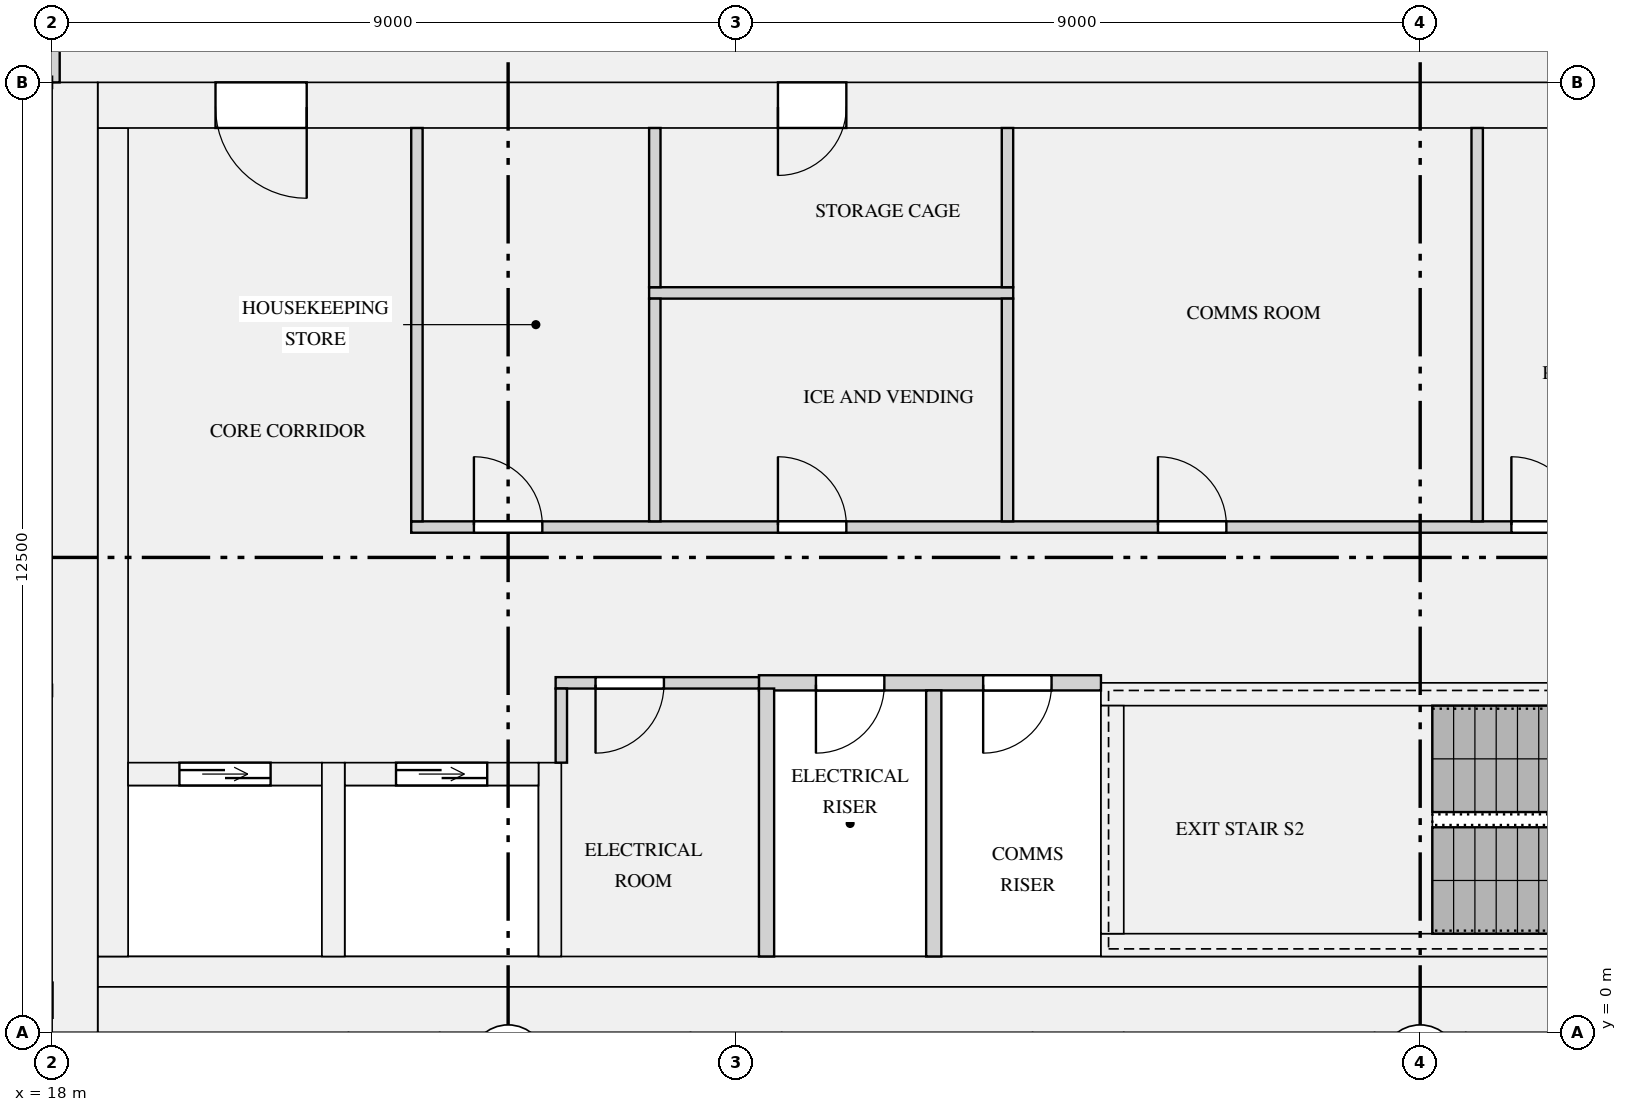
"""IFC4 building model, lengths in metres.
Left out: names, types, materials, properties, quantities, classifications, styles, units other than length and angle.
Written with IfcOpenShell. Run it as: python <this file> out.ifc"""

import sys

from ifc_helpers import new_model, si_unit, direction, frame, frame_2d, origin, place, context, subcontext, project, spatial, rectangle, extrude, element, fill, save


model = new_model("IFC4")
c1 = context("Model", 3, precision=1e-05, world=origin(), true_north=direction((0.0, 1.0)))
c2 = subcontext(c1, "Body", "Model", "MODEL_VIEW")
j1 = project(units=[si_unit("LENGTHUNIT", "METRE"), si_unit("PLANEANGLEUNIT", "RADIAN")], contexts=[c1])
p1 = place(None, origin())
s1 = spatial("IfcSite", under=j1, at=p1, CompositionType="ELEMENT")
p2 = place(p1, origin())
s2 = spatial("IfcBuilding", under=s1, at=p2, CompositionType="ELEMENT")
p3 = place(p2, frame((0.0, 0.0, 216.9)))
s3 = spatial("IfcBuildingStorey", under=s2, at=p3, CompositionType="ELEMENT", Elevation=216.9)
p4 = place(p3, frame((18.3, 0.0, 0.0), z_axis=(0.0, 0.0, 1.0), x_axis=(0.0, 1.0, 0.0)))
e1 = element("IfcWall", 1, at=p4, inside=s3, PredefinedType="SHEAR", context=c2, shape_type="SweptSolid", body=[
    extrude(rectangle(XDim=12.5, YDim=0.6, at=frame_2d((6.25, 0.0))), origin(), (0.0, 0.0, 1.0), 3.15),
])
p5 = place(p3, frame((18.6, 0.3, 0.0), z_axis=(0.0, 0.0, 1.0), x_axis=(1.0, 0.0, 0.0)))
e2 = element("IfcWall", 2, at=p5, inside=s3, PredefinedType="SHEAR", context=c2, shape_type="SweptSolid", body=[
    extrude(rectangle(XDim=34.8, YDim=0.6, at=frame_2d((17.4, 0.0))), origin(), (0.0, 0.0, 1.0), 3.15),
])
p6 = place(p3, frame((18.6, 12.2, 0.0), z_axis=(0.0, 0.0, 1.0), x_axis=(1.0, 0.0, 0.0)))
e3 = element("IfcWall", 3, at=p6, inside=s3, PredefinedType="SHEAR", context=c2, shape_type="SweptSolid", body=[
    extrude(rectangle(XDim=34.8, YDim=0.6, at=frame_2d((17.4, 0.0))), origin(), (0.0, 0.0, 1.0), 3.15),
])
p7 = place(p6, frame((24.575, 0.0, 0.0)))
e4 = element("IfcOpeningElement", 4, at=p7, cuts=e3, PredefinedType="OPENING", context=c2, shape_type="SweptSolid", body=[
    extrude(rectangle(XDim=1.1, YDim=2.1, at=frame_2d((0.55, 1.05))), frame((0.0, 0.31, 0.0), z_axis=(0.0, -1.0, 0.0), x_axis=(1.0, 0.0, 0.0)), (0.0, 0.0, 1.0), 0.62),
])
p8 = place(p6, frame((26.825, 0.0, 0.0)))
e5 = element("IfcOpeningElement", 5, at=p8, cuts=e3, PredefinedType="OPENING", context=c2, shape_type="SweptSolid", body=[
    extrude(rectangle(XDim=1.1, YDim=2.1, at=frame_2d((0.55, 1.05))), frame((0.0, 0.31, 0.0), z_axis=(0.0, -1.0, 0.0), x_axis=(1.0, 0.0, 0.0)), (0.0, 0.0, 1.0), 0.62),
])
p9 = place(p6, frame((29.075, 0.0, 0.0)))
e6 = element("IfcOpeningElement", 6, at=p9, cuts=e3, PredefinedType="OPENING", context=c2, shape_type="SweptSolid", body=[
    extrude(rectangle(XDim=1.1, YDim=2.1, at=frame_2d((0.55, 1.05))), frame((0.0, 0.31, 0.0), z_axis=(0.0, -1.0, 0.0), x_axis=(1.0, 0.0, 0.0)), (0.0, 0.0, 1.0), 0.62),
])
p10 = place(p6, frame((8.95, 0.0, 0.0)))
e7 = element("IfcOpeningElement", 7, at=p10, cuts=e3, PredefinedType="OPENING", context=c2, shape_type="SweptSolid", body=[
    extrude(rectangle(XDim=0.9, YDim=2.1, at=frame_2d((0.45, 1.05))), frame((0.0, 0.31, 0.0), z_axis=(0.0, -1.0, 0.0), x_axis=(1.0, 0.0, 0.0)), (0.0, 0.0, 1.0), 0.62),
])
p11 = place(p6, frame((1.55, 0.0, 0.0)))
e8 = element("IfcOpeningElement", 8, at=p11, cuts=e3, PredefinedType="OPENING", context=c2, shape_type="SweptSolid", body=[
    extrude(rectangle(XDim=1.2, YDim=2.1, at=frame_2d((0.6, 1.05))), frame((0.0, 0.31, 0.0), z_axis=(0.0, -1.0, 0.0), x_axis=(1.0, 0.0, 0.0)), (0.0, 0.0, 1.0), 0.62),
])
p12 = place(p6, frame((32.05, 0.0, 0.0)))
e9 = element("IfcOpeningElement", 9, at=p12, cuts=e3, PredefinedType="OPENING", context=c2, shape_type="SweptSolid", body=[
    extrude(rectangle(XDim=1.2, YDim=2.1, at=frame_2d((0.6, 1.05))), frame((0.0, 0.31, 0.0), z_axis=(0.0, -1.0, 0.0), x_axis=(1.0, 0.0, 0.0)), (0.0, 0.0, 1.0), 0.62),
])
p13 = place(p3, frame((18.8, 1.0, 0.0), z_axis=(0.0, 0.0, 1.0), x_axis=(0.0, 1.0, 0.0)))
e10 = element("IfcWall", 10, at=p13, inside=s3, PredefinedType="SHEAR", context=c2, shape_type="SweptSolid", body=[
    extrude(rectangle(XDim=10.9, YDim=0.4, at=frame_2d((5.45, 0.0))), origin(), (0.0, 0.0, 1.0), 3.15),
])
p14 = place(p3, frame((18.6, 0.8, 0.0), z_axis=(0.0, 0.0, 1.0), x_axis=(1.0, 0.0, 0.0)))
e11 = element("IfcWall", 11, at=p14, inside=s3, PredefinedType="SHEAR", context=c2, shape_type="SweptSolid", body=[
    extrude(rectangle(XDim=34.8, YDim=0.4, at=frame_2d((17.4, 0.0))), origin(), (0.0, 0.0, 1.0), 3.15),
])
p15 = place(p3, frame((19.0, 3.4, 0.0), z_axis=(0.0, 0.0, 1.0), x_axis=(1.0, 0.0, 0.0)))
e12 = element("IfcWall", 12, at=p15, inside=s3, PredefinedType="SHEAR", context=c2, shape_type="SweptSolid", body=[
    extrude(rectangle(XDim=2.55, YDim=0.3, at=frame_2d((1.275, 0.0))), origin(), (0.0, 0.0, 1.0), 3.15),
])
p16 = place(p15, frame((0.675, 0.0, 0.0)))
e13 = element("IfcOpeningElement", 13, at=p16, cuts=e12, PredefinedType="OPENING", context=c2, shape_type="SweptSolid", body=[
    extrude(rectangle(XDim=1.2, YDim=2.1, at=frame_2d((0.6, 1.05))), frame((0.0, 0.16, 0.0), z_axis=(0.0, -1.0, 0.0), x_axis=(1.0, 0.0, 0.0)), (0.0, 0.0, 1.0), 0.32),
])
p17 = place(p3, frame((21.85, 3.4, 0.0), z_axis=(0.0, 0.0, 1.0), x_axis=(1.0, 0.0, 0.0)))
e14 = element("IfcWall", 14, at=p17, inside=s3, PredefinedType="SHEAR", context=c2, shape_type="SweptSolid", body=[
    extrude(rectangle(XDim=2.55, YDim=0.3, at=frame_2d((1.275, 0.0))), origin(), (0.0, 0.0, 1.0), 3.15),
])
p18 = place(p17, frame((0.675, 0.0, 0.0)))
e15 = element("IfcOpeningElement", 15, at=p18, cuts=e14, PredefinedType="OPENING", context=c2, shape_type="SweptSolid", body=[
    extrude(rectangle(XDim=1.2, YDim=2.1, at=frame_2d((0.6, 1.05))), frame((0.0, 0.16, 0.0), z_axis=(0.0, -1.0, 0.0), x_axis=(1.0, 0.0, 0.0)), (0.0, 0.0, 1.0), 0.32),
])
for number, where, z_axis, x_axis in (
    (16, (21.7, 1.0, 0.0), (0.0, 0.0, 1.0), (0.0, 1.0, 0.0)),
    (17, (24.55, 1.0, 0.0), (0.0, 0.0, 1.0), (0.0, 1.0, 0.0)),
):
    element("IfcWall", number, at=place(p3, frame(where, z_axis=z_axis, x_axis=x_axis)), inside=s3, PredefinedType="SHEAR", context=c2, shape_type="SweptSolid", body=[
        extrude(rectangle(XDim=2.55, YDim=0.3, at=frame_2d((1.275, 0.0))), origin(), (0.0, 0.0, 1.0), 3.15),
    ])
p19 = place(p3, frame((31.8, 1.15, 0.0), z_axis=(0.0, 0.0, 1.0), x_axis=(1.0, 0.0, 0.0)))
e18 = element("IfcWall", 18, at=p19, inside=s3, PredefinedType="SHEAR", context=c2, shape_type="SweptSolid", body=[
    extrude(rectangle(XDim=8.4, YDim=0.3, at=frame_2d((4.2, 0.0))), origin(), (0.0, 0.0, 1.0), 3.15),
])
p20 = place(p3, frame((31.8, 4.45, 0.0), z_axis=(0.0, 0.0, 1.0), x_axis=(1.0, 0.0, 0.0)))
e19 = element("IfcWall", 19, at=p20, inside=s3, PredefinedType="SHEAR", context=c2, shape_type="SweptSolid", body=[
    extrude(rectangle(XDim=8.4, YDim=0.3, at=frame_2d((4.2, 0.0))), origin(), (0.0, 0.0, 1.0), 3.15),
])
p21 = place(p20, frame((6.8, 0.0, 0.0)))
e20 = element("IfcOpeningElement", 20, at=p21, cuts=e19, PredefinedType="OPENING", context=c2, shape_type="SweptSolid", body=[
    extrude(rectangle(XDim=1.1, YDim=2.1, at=frame_2d((0.55, 1.05))), frame((0.0, 0.16, 0.0), z_axis=(0.0, -1.0, 0.0), x_axis=(1.0, 0.0, 0.0)), (0.0, 0.0, 1.0), 0.32),
])
p22 = place(p3, frame((31.95, 1.3, 0.0), z_axis=(0.0, 0.0, 1.0), x_axis=(0.0, 1.0, 0.0)))
e21 = element("IfcWall", 21, at=p22, inside=s3, PredefinedType="SHEAR", context=c2, shape_type="SweptSolid", body=[
    extrude(rectangle(XDim=3.0, YDim=0.3, at=frame_2d((1.5, 0.0))), origin(), (0.0, 0.0, 1.0), 3.15),
])
p23 = place(p3, frame((27.3, 4.6, 0.0), z_axis=(0.0, 0.0, 1.0), x_axis=(1.0, 0.0, 0.0)))
e22 = element("IfcWall", 22, at=p23, inside=s3, PredefinedType="PARTITIONING", context=c2, shape_type="SweptSolid", body=[
    extrude(rectangle(XDim=4.5, YDim=0.2, at=frame_2d((2.25, 0.0))), origin(), (0.0, 0.0, 1.0), 2.83),
])
p24 = place(p23, frame((0.75, 0.0, 0.0)))
e23 = element("IfcOpeningElement", 23, at=p24, cuts=e22, PredefinedType="OPENING", context=c2, shape_type="SweptSolid", body=[
    extrude(rectangle(XDim=0.9, YDim=2.1, at=frame_2d((0.45, 1.05))), frame((0.0, 0.11, 0.0), z_axis=(0.0, -1.0, 0.0), x_axis=(1.0, 0.0, 0.0)), (0.0, 0.0, 1.0), 0.22),
])
p25 = place(p23, frame((2.95, 0.0, 0.0)))
e24 = element("IfcOpeningElement", 24, at=p25, cuts=e22, PredefinedType="OPENING", context=c2, shape_type="SweptSolid", body=[
    extrude(rectangle(XDim=0.9, YDim=2.1, at=frame_2d((0.45, 1.05))), frame((0.0, 0.11, 0.0), z_axis=(0.0, -1.0, 0.0), x_axis=(1.0, 0.0, 0.0)), (0.0, 0.0, 1.0), 0.22),
])
p26 = place(p3, frame((24.625, 4.6, 0.0), z_axis=(0.0, 0.0, 1.0), x_axis=(1.0, 0.0, 0.0)))
e25 = element("IfcWall", 25, at=p26, inside=s3, PredefinedType="PARTITIONING", context=c2, shape_type="SweptSolid", body=[
    extrude(rectangle(XDim=2.675, YDim=0.15, at=frame_2d((1.337, 0.0))), origin(), (0.0, 0.0, 1.0), 2.83),
])
p27 = place(p26, frame((0.525, 0.0, 0.0)))
e26 = element("IfcOpeningElement", 26, at=p27, cuts=e25, PredefinedType="OPENING", context=c2, shape_type="SweptSolid", body=[
    extrude(rectangle(XDim=0.9, YDim=2.1, at=frame_2d((0.45, 1.05))), frame((0.0, 0.085, 0.0), z_axis=(0.0, -1.0, 0.0), x_axis=(1.0, 0.0, 0.0)), (0.0, 0.0, 1.0), 0.17),
])
p28 = place(p3, frame((22.725, 6.65, 0.0), z_axis=(0.0, 0.0, 1.0), x_axis=(1.0, 0.0, 0.0)))
e27 = element("IfcWall", 27, at=p28, inside=s3, PredefinedType="PARTITIONING", context=c2, shape_type="SweptSolid", body=[
    extrude(rectangle(XDim=19.8, YDim=0.15, at=frame_2d((9.9, 0.0))), origin(), (0.0, 0.0, 1.0), 2.83),
])
p29 = place(p28, frame((0.825, 0.0, 0.0)))
e28 = element("IfcOpeningElement", 28, at=p29, cuts=e27, PredefinedType="OPENING", context=c2, shape_type="SweptSolid", body=[
    extrude(rectangle(XDim=0.9, YDim=2.1, at=frame_2d((0.45, 1.05))), frame((0.0, 0.085, 0.0), z_axis=(0.0, -1.0, 0.0), x_axis=(1.0, 0.0, 0.0)), (0.0, 0.0, 1.0), 0.17),
])
p30 = place(p28, frame((4.825, 0.0, 0.0)))
e29 = element("IfcOpeningElement", 29, at=p30, cuts=e27, PredefinedType="OPENING", context=c2, shape_type="SweptSolid", body=[
    extrude(rectangle(XDim=0.9, YDim=2.1, at=frame_2d((0.45, 1.05))), frame((0.0, 0.085, 0.0), z_axis=(0.0, -1.0, 0.0), x_axis=(1.0, 0.0, 0.0)), (0.0, 0.0, 1.0), 0.17),
])
p31 = place(p28, frame((9.825, 0.0, 0.0)))
e30 = element("IfcOpeningElement", 30, at=p31, cuts=e27, PredefinedType="OPENING", context=c2, shape_type="SweptSolid", body=[
    extrude(rectangle(XDim=0.9, YDim=2.1, at=frame_2d((0.45, 1.05))), frame((0.0, 0.085, 0.0), z_axis=(0.0, -1.0, 0.0), x_axis=(1.0, 0.0, 0.0)), (0.0, 0.0, 1.0), 0.17),
])
p32 = place(p28, frame((14.475, 0.0, 0.0)))
e31 = element("IfcOpeningElement", 31, at=p32, cuts=e27, PredefinedType="OPENING", context=c2, shape_type="SweptSolid", body=[
    extrude(rectangle(XDim=0.9, YDim=2.1, at=frame_2d((0.45, 1.05))), frame((0.0, 0.085, 0.0), z_axis=(0.0, -1.0, 0.0), x_axis=(1.0, 0.0, 0.0)), (0.0, 0.0, 1.0), 0.17),
])
p33 = place(p28, frame((17.825, 0.0, 0.0)))
e32 = element("IfcOpeningElement", 32, at=p33, cuts=e27, PredefinedType="OPENING", context=c2, shape_type="SweptSolid", body=[
    extrude(rectangle(XDim=0.9, YDim=2.1, at=frame_2d((0.45, 1.05))), frame((0.0, 0.085, 0.0), z_axis=(0.0, -1.0, 0.0), x_axis=(1.0, 0.0, 0.0)), (0.0, 0.0, 1.0), 0.17),
])
p34 = place(p3, frame((25.855, 9.73, 0.0), z_axis=(0.0, 0.0, 1.0), x_axis=(1.0, 0.0, 0.0)))
e33 = element("IfcWall", 33, at=p34, inside=s3, PredefinedType="PARTITIONING", context=c2, shape_type="SweptSolid", body=[
    extrude(rectangle(XDim=4.79, YDim=0.15, at=frame_2d((2.395, 0.0))), origin(), (0.0, 0.0, 1.0), 2.83),
])
p35 = place(p3, frame((27.4, 1.0, 0.0), z_axis=(0.0, 0.0, 1.0), x_axis=(0.0, 1.0, 0.0)))
e34 = element("IfcWall", 34, at=p35, inside=s3, PredefinedType="PARTITIONING", context=c2, shape_type="SweptSolid", body=[
    extrude(rectangle(XDim=3.525, YDim=0.2, at=frame_2d((1.762, 0.0))), origin(), (0.0, 0.0, 1.0), 2.83),
])
p36 = place(p3, frame((29.6, 1.0, 0.0), z_axis=(0.0, 0.0, 1.0), x_axis=(0.0, 1.0, 0.0)))
e35 = element("IfcWall", 35, at=p36, inside=s3, PredefinedType="PARTITIONING", context=c2, shape_type="SweptSolid", body=[
    extrude(rectangle(XDim=3.5, YDim=0.2, at=frame_2d((1.75, 0.0))), origin(), (0.0, 0.0, 1.0), 2.83),
])
p37 = place(p3, frame((24.7, 3.55, 0.0), z_axis=(0.0, 0.0, 1.0), x_axis=(0.0, 1.0, 0.0)))
e36 = element("IfcWall", 36, at=p37, inside=s3, PredefinedType="PARTITIONING", context=c2, shape_type="SweptSolid", body=[
    extrude(rectangle(XDim=0.975, YDim=0.15, at=frame_2d((0.487, 0.0))), origin(), (0.0, 0.0, 1.0), 2.83),
])
p38 = place(p3, frame((22.8, 6.725, 0.0), z_axis=(0.0, 0.0, 1.0), x_axis=(0.0, 1.0, 0.0)))
e37 = element("IfcWall", 37, at=p38, inside=s3, PredefinedType="PARTITIONING", context=c2, shape_type="SweptSolid", body=[
    extrude(rectangle(XDim=5.175, YDim=0.15, at=frame_2d((2.587, 0.0))), origin(), (0.0, 0.0, 1.0), 2.83),
])
for number, where, z_axis, x_axis in (
    (38, (25.93, 6.725, 0.0), (0.0, 0.0, 1.0), (0.0, 1.0, 0.0)),
    (39, (30.57, 6.725, 0.0), (0.0, 0.0, 1.0), (0.0, 1.0, 0.0)),
):
    element("IfcWall", number, at=place(p3, frame(where, z_axis=z_axis, x_axis=x_axis)), inside=s3, PredefinedType="PARTITIONING", context=c2, shape_type="SweptSolid", body=[
        extrude(rectangle(XDim=2.93, YDim=0.15, at=frame_2d((1.465, 0.0))), origin(), (0.0, 0.0, 1.0), 2.83),
    ])
p39 = place(p3, frame((36.75, 6.725, 0.0), z_axis=(0.0, 0.0, 1.0), x_axis=(0.0, 1.0, 0.0)))
e40 = element("IfcWall", 40, at=p39, inside=s3, PredefinedType="PARTITIONING", context=c2, shape_type="SweptSolid", body=[
    extrude(rectangle(XDim=5.175, YDim=0.15, at=frame_2d((2.587, 0.0))), origin(), (0.0, 0.0, 1.0), 2.83),
])
for number, where, z_axis, x_axis in (
    (41, (25.93, 9.805, 0.0), (0.0, 0.0, 1.0), (0.0, 1.0, 0.0)),
    (42, (30.57, 9.805, 0.0), (0.0, 0.0, 1.0), (0.0, 1.0, 0.0)),
):
    element("IfcWall", number, at=place(p3, frame(where, z_axis=z_axis, x_axis=x_axis)), inside=s3, PredefinedType="PARTITIONING", context=c2, shape_type="SweptSolid", body=[
        extrude(rectangle(XDim=2.095, YDim=0.15, at=frame_2d((1.047, 0.0))), origin(), (0.0, 0.0, 1.0), 2.83),
    ])
p40 = place(p3, frame((18.0, 12.5, 0.0), z_axis=(0.0, 0.0, 1.0), x_axis=(0.0, 1.0, 0.0)))
e43 = element("IfcWall", 43, at=p40, inside=s3, PredefinedType="PARTITIONING", context=c2, shape_type="SweptSolid", body=[
    extrude(rectangle(XDim=3.4, YDim=0.2, at=frame_2d((1.7, 0.0))), origin(), (0.0, 0.0, 1.0), 2.83),
])
p41 = place(p16, origin())
e44 = element("IfcDoor", 44, at=p41, inside=s3, OperationType="DOUBLE_DOOR_SLIDING", PredefinedType="DOOR", context=c2, shape_type="SweptSolid", body=[
    extrude(rectangle(XDim=1.2, YDim=2.1, at=frame_2d((0.6, 1.05))), frame((0.0, 0.025, 0.0), z_axis=(0.0, -1.0, 0.0), x_axis=(1.0, 0.0, 0.0)), (0.0, 0.0, 1.0), 0.05),
])
fill(e13, e44)
p42 = place(p18, origin())
e45 = element("IfcDoor", 45, at=p42, inside=s3, OperationType="DOUBLE_DOOR_SLIDING", PredefinedType="DOOR", context=c2, shape_type="SweptSolid", body=[
    extrude(rectangle(XDim=1.2, YDim=2.1, at=frame_2d((0.6, 1.05))), frame((0.0, 0.025, 0.0), z_axis=(0.0, -1.0, 0.0), x_axis=(1.0, 0.0, 0.0)), (0.0, 0.0, 1.0), 0.05),
])
fill(e15, e45)
p43 = place(p27, frame((0.9, 0.0, 0.0), z_axis=(0.0, 0.0, 1.0), x_axis=(-1.0, 0.0, 0.0)))
e46 = element("IfcDoor", 46, at=p43, inside=s3, OperationType="SINGLE_SWING_RIGHT", PredefinedType="DOOR", context=c2, shape_type="SweptSolid", body=[
    extrude(rectangle(XDim=0.9, YDim=2.1, at=frame_2d((0.45, 1.05))), frame((0.0, 0.025, 0.0), z_axis=(0.0, -1.0, 0.0), x_axis=(1.0, 0.0, 0.0)), (0.0, 0.0, 1.0), 0.05),
])
fill(e26, e46)
p44 = place(p29, origin())
e47 = element("IfcDoor", 47, at=p44, inside=s3, OperationType="SINGLE_SWING_LEFT", PredefinedType="DOOR", context=c2, shape_type="SweptSolid", body=[
    extrude(rectangle(XDim=0.9, YDim=2.1, at=frame_2d((0.45, 1.05))), frame((0.0, 0.025, 0.0), z_axis=(0.0, -1.0, 0.0), x_axis=(1.0, 0.0, 0.0)), (0.0, 0.0, 1.0), 0.05),
])
fill(e28, e47)
p45 = place(p30, origin())
e48 = element("IfcDoor", 48, at=p45, inside=s3, OperationType="SINGLE_SWING_LEFT", PredefinedType="DOOR", context=c2, shape_type="SweptSolid", body=[
    extrude(rectangle(XDim=0.9, YDim=2.1, at=frame_2d((0.45, 1.05))), frame((0.0, 0.025, 0.0), z_axis=(0.0, -1.0, 0.0), x_axis=(1.0, 0.0, 0.0)), (0.0, 0.0, 1.0), 0.05),
])
fill(e29, e48)
p46 = place(p10, frame((0.9, 0.0, 0.0), z_axis=(0.0, 0.0, 1.0), x_axis=(-1.0, 0.0, 0.0)))
e49 = element("IfcDoor", 49, at=p46, inside=s3, OperationType="SINGLE_SWING_RIGHT", PredefinedType="DOOR", context=c2, shape_type="SweptSolid", body=[
    extrude(rectangle(XDim=0.9, YDim=2.1, at=frame_2d((0.45, 1.05))), frame((0.0, 0.025, 0.0), z_axis=(0.0, -1.0, 0.0), x_axis=(1.0, 0.0, 0.0)), (0.0, 0.0, 1.0), 0.05),
])
fill(e7, e49)
p47 = place(p31, origin())
e50 = element("IfcDoor", 50, at=p47, inside=s3, OperationType="SINGLE_SWING_LEFT", PredefinedType="DOOR", context=c2, shape_type="SweptSolid", body=[
    extrude(rectangle(XDim=0.9, YDim=2.1, at=frame_2d((0.45, 1.05))), frame((0.0, 0.025, 0.0), z_axis=(0.0, -1.0, 0.0), x_axis=(1.0, 0.0, 0.0)), (0.0, 0.0, 1.0), 0.05),
])
fill(e30, e50)
p48 = place(p32, origin())
e51 = element("IfcDoor", 51, at=p48, inside=s3, OperationType="SINGLE_SWING_LEFT", PredefinedType="DOOR", context=c2, shape_type="SweptSolid", body=[
    extrude(rectangle(XDim=0.9, YDim=2.1, at=frame_2d((0.45, 1.05))), frame((0.0, 0.025, 0.0), z_axis=(0.0, -1.0, 0.0), x_axis=(1.0, 0.0, 0.0)), (0.0, 0.0, 1.0), 0.05),
])
fill(e31, e51)
p49 = place(p24, frame((0.9, 0.0, 0.0), z_axis=(0.0, 0.0, 1.0), x_axis=(-1.0, 0.0, 0.0)))
e52 = element("IfcDoor", 52, at=p49, inside=s3, OperationType="SINGLE_SWING_RIGHT", PredefinedType="DOOR", context=c2, shape_type="SweptSolid", body=[
    extrude(rectangle(XDim=0.9, YDim=2.1, at=frame_2d((0.45, 1.05))), frame((0.0, 0.025, 0.0), z_axis=(0.0, -1.0, 0.0), x_axis=(1.0, 0.0, 0.0)), (0.0, 0.0, 1.0), 0.05),
])
fill(e23, e52)
p50 = place(p25, frame((0.9, 0.0, 0.0), z_axis=(0.0, 0.0, 1.0), x_axis=(-1.0, 0.0, 0.0)))
e53 = element("IfcDoor", 53, at=p50, inside=s3, OperationType="SINGLE_SWING_RIGHT", PredefinedType="DOOR", context=c2, shape_type="SweptSolid", body=[
    extrude(rectangle(XDim=0.9, YDim=2.1, at=frame_2d((0.45, 1.05))), frame((0.0, 0.025, 0.0), z_axis=(0.0, -1.0, 0.0), x_axis=(1.0, 0.0, 0.0)), (0.0, 0.0, 1.0), 0.05),
])
fill(e24, e53)
p51 = place(p11, frame((1.2, 0.0, 0.0), z_axis=(0.0, 0.0, 1.0), x_axis=(-1.0, 0.0, 0.0)))
e54 = element("IfcDoor", 54, at=p51, inside=s3, OperationType="SINGLE_SWING_LEFT", PredefinedType="DOOR", context=c2, shape_type="SweptSolid", body=[
    extrude(rectangle(XDim=1.2, YDim=2.1, at=frame_2d((0.6, 1.05))), frame((0.0, 0.025, 0.0), z_axis=(0.0, -1.0, 0.0), x_axis=(1.0, 0.0, 0.0)), (0.0, 0.0, 1.0), 0.05),
])
fill(e8, e54)
save(model, sys.argv[1])
